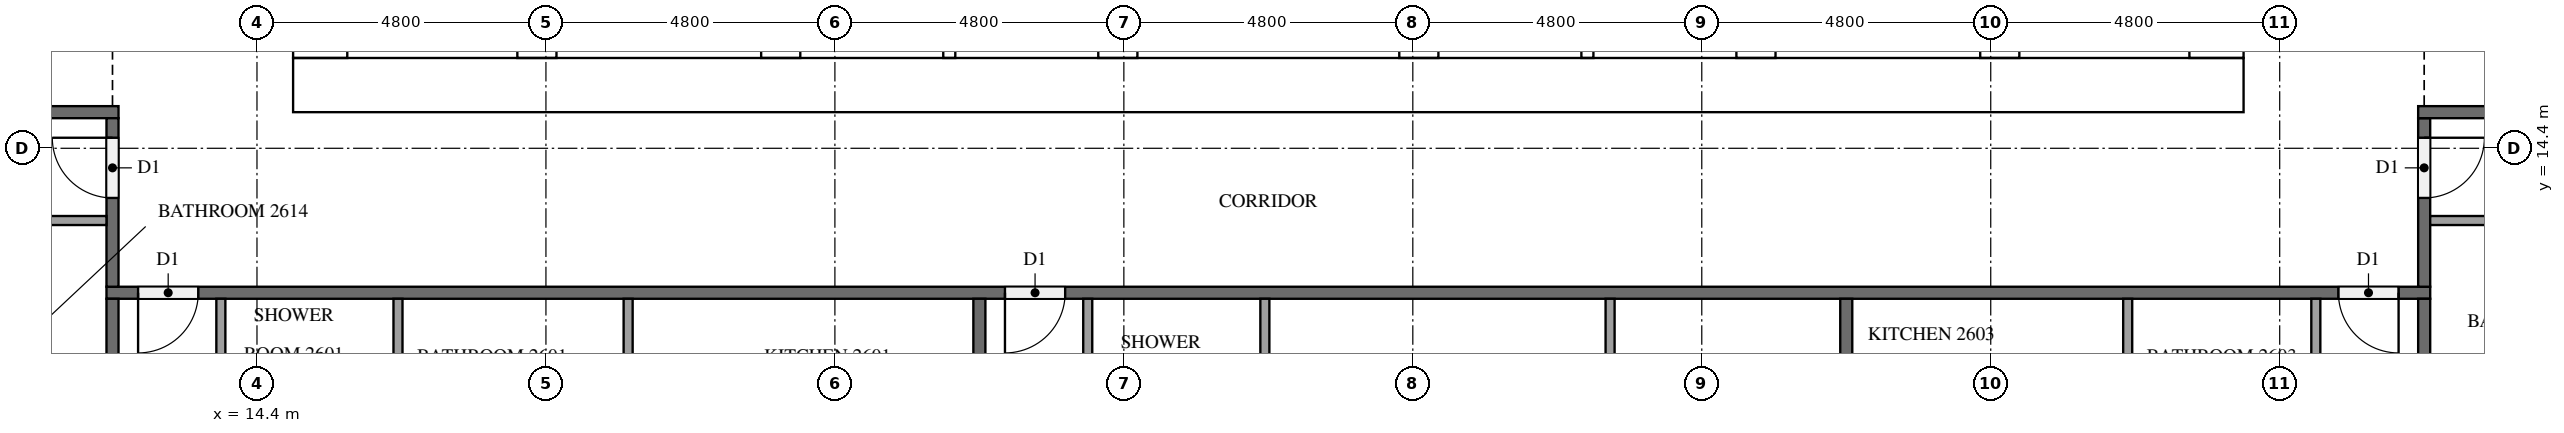
"""IFC4 building model, lengths in metres.
Left out: names, types, materials, properties, quantities, classifications, styles, units other than length and angle.
Written with IfcOpenShell. Run it as: python <this file> out.ifc"""

import sys

from ifc_helpers import new_model, si_unit, direction, frame, frame_2d, origin, place, context, subcontext, project, spatial, rectangle, extrude, element, fill, save


model = new_model("IFC4")
c1 = context("Model", 3, precision=1e-05, world=origin(), true_north=direction((0.0, 1.0)))
c2 = subcontext(c1, "Body", "Model", "MODEL_VIEW")
j1 = project(units=[si_unit("LENGTHUNIT", "METRE"), si_unit("PLANEANGLEUNIT", "RADIAN")], contexts=[c1])
p1 = place(None, origin())
s1 = spatial("IfcSite", under=j1, at=p1, CompositionType="ELEMENT")
p2 = place(p1, origin())
s2 = spatial("IfcBuilding", under=s1, at=p2, CompositionType="ELEMENT")
p3 = place(p2, frame((0.0, 0.0, 103.2)))
s3 = spatial("IfcBuildingStorey", under=s2, at=p3, CompositionType="ELEMENT", Elevation=103.2)
p4 = place(p3, frame((15.0, 15.45, 0.0), z_axis=(0.0, 0.0, 1.0), x_axis=(1.0, 0.0, 0.0)))
e1 = element("IfcWall", 1, at=p4, inside=s3, PredefinedType="SHEAR", context=c2, shape_type="SweptSolid", body=[
    extrude(rectangle(XDim=32.4, YDim=0.9, at=frame_2d((16.2, 0.0))), origin(), (0.0, 0.0, 1.0), 3.2),
])
p5 = place(p4, frame((15.3, 0.0, 0.0)))
e2 = element("IfcOpeningElement", 2, at=p5, cuts=e1, PredefinedType="OPENING", context=c2, shape_type="SweptSolid", body=[
    extrude(rectangle(XDim=1.8, YDim=2.1, at=frame_2d((0.9, 1.05))), frame((0.0, 0.46, 0.0), z_axis=(0.0, -1.0, 0.0), x_axis=(1.0, 0.0, 0.0)), (0.0, 0.0, 1.0), 0.92),
])
p6 = place(p3, frame((15.45, 15.9, 0.0), z_axis=(0.0, 0.0, 1.0), x_axis=(0.0, 1.0, 0.0)))
e3 = element("IfcWall", 3, at=p6, inside=s3, PredefinedType="SHEAR", context=c2, shape_type="SweptSolid", body=[
    extrude(rectangle(XDim=21.0, YDim=0.9, at=frame_2d((10.5, 0.0))), origin(), (0.0, 0.0, 1.0), 3.2),
])
p7 = place(p6, frame((4.86, 0.0, 0.0)))
e4 = element("IfcOpeningElement", 4, at=p7, cuts=e3, PredefinedType="OPENING", context=c2, shape_type="SweptSolid", body=[
    extrude(rectangle(XDim=1.2, YDim=2.1, at=frame_2d((0.6, 1.05))), frame((0.0, 0.46, 0.0), z_axis=(0.0, -1.0, 0.0), x_axis=(1.0, 0.0, 0.0)), (0.0, 0.0, 1.0), 0.92),
])
p8 = place(p3, frame((46.95, 15.9, 0.0), z_axis=(0.0, 0.0, 1.0), x_axis=(0.0, 1.0, 0.0)))
e5 = element("IfcWall", 5, at=p8, inside=s3, PredefinedType="SHEAR", context=c2, shape_type="SweptSolid", body=[
    extrude(rectangle(XDim=21.0, YDim=0.9, at=frame_2d((10.5, 0.0))), origin(), (0.0, 0.0, 1.0), 3.2),
])
p9 = place(p8, frame((10.2, 0.0, 0.0)))
e6 = element("IfcOpeningElement", 6, at=p9, cuts=e5, PredefinedType="OPENING", context=c2, shape_type="SweptSolid", body=[
    extrude(rectangle(XDim=1.2, YDim=2.1, at=frame_2d((0.6, 1.05))), frame((0.0, 0.46, 0.0), z_axis=(0.0, -1.0, 0.0), x_axis=(1.0, 0.0, 0.0)), (0.0, 0.0, 1.0), 0.92),
])
p10 = place(p3, frame((19.05, 15.9, 0.0), z_axis=(0.0, 0.0, 1.0), x_axis=(0.0, 1.0, 0.0)))
e7 = element("IfcWall", 7, at=p10, inside=s3, PredefinedType="SHEAR", context=c2, shape_type="SweptSolid", body=[
    extrude(rectangle(XDim=15.025, YDim=0.65, at=frame_2d((7.513, 0.0))), origin(), (0.0, 0.0, 1.0), 3.2),
])
p11 = place(p10, frame((9.55, 0.0, 0.0)))
e8 = element("IfcOpeningElement", 8, at=p11, cuts=e7, PredefinedType="OPENING", context=c2, shape_type="SweptSolid", body=[
    extrude(rectangle(XDim=1.1, YDim=2.1, at=frame_2d((0.55, 1.05))), frame((0.0, 0.335, 0.0), z_axis=(0.0, -1.0, 0.0), x_axis=(1.0, 0.0, 0.0)), (0.0, 0.0, 1.0), 0.67),
])
p12 = place(p10, frame((13.05, 0.0, 0.0)))
e9 = element("IfcOpeningElement", 9, at=p12, cuts=e7, PredefinedType="OPENING", context=c2, shape_type="SweptSolid", body=[
    extrude(rectangle(XDim=1.1, YDim=2.1, at=frame_2d((0.55, 1.05))), frame((0.0, 0.335, 0.0), z_axis=(0.0, -1.0, 0.0), x_axis=(1.0, 0.0, 0.0)), (0.0, 0.0, 1.0), 0.67),
])
p13 = place(p10, frame((0.3, 0.0, 0.0)))
e10 = element("IfcOpeningElement", 10, at=p13, cuts=e7, PredefinedType="OPENING", context=c2, shape_type="SweptSolid", body=[
    extrude(rectangle(XDim=1.2, YDim=2.1, at=frame_2d((0.6, 1.05))), frame((0.0, 0.335, 0.0), z_axis=(0.0, -1.0, 0.0), x_axis=(1.0, 0.0, 0.0)), (0.0, 0.0, 1.0), 0.67),
])
p14 = place(p3, frame((23.1, 15.9, 0.0), z_axis=(0.0, 0.0, 1.0), x_axis=(0.0, 1.0, 0.0)))
e11 = element("IfcWall", 11, at=p14, inside=s3, PredefinedType="SHEAR", context=c2, shape_type="SweptSolid", body=[
    extrude(rectangle(XDim=21.0, YDim=0.65, at=frame_2d((10.5, 0.0))), origin(), (0.0, 0.0, 1.0), 3.2),
])
p15 = place(p3, frame((39.3, 15.9, 0.0), z_axis=(0.0, 0.0, 1.0), x_axis=(0.0, 1.0, 0.0)))
e12 = element("IfcWall", 12, at=p15, inside=s3, PredefinedType="SHEAR", context=c2, shape_type="SweptSolid", body=[
    extrude(rectangle(XDim=8.35, YDim=0.65, at=frame_2d((4.175, 0.0))), origin(), (0.0, 0.0, 1.0), 3.2),
])
p16 = place(p3, frame((43.35, 15.9, 0.0), z_axis=(0.0, 0.0, 1.0), x_axis=(0.0, 1.0, 0.0)))
e13 = element("IfcWall", 13, at=p16, inside=s3, PredefinedType="SHEAR", context=c2, shape_type="SweptSolid", body=[
    extrude(rectangle(XDim=8.35, YDim=0.65, at=frame_2d((4.175, 0.0))), origin(), (0.0, 0.0, 1.0), 3.2),
])
p17 = place(p16, frame((0.3, 0.0, 0.0)))
e14 = element("IfcOpeningElement", 14, at=p17, cuts=e13, PredefinedType="OPENING", context=c2, shape_type="SweptSolid", body=[
    extrude(rectangle(XDim=1.2, YDim=2.1, at=frame_2d((0.6, 1.05))), frame((0.0, 0.335, 0.0), z_axis=(0.0, -1.0, 0.0), x_axis=(1.0, 0.0, 0.0)), (0.0, 0.0, 1.0), 0.67),
])
for number, where, z_axis, x_axis in (
    (15, (28.7, 15.9, 0.0), (0.0, 0.0, 1.0), (0.0, 1.0, 0.0)),
    (16, (33.7, 15.9, 0.0), (0.0, 0.0, 1.0), (0.0, 1.0, 0.0)),
):
    element("IfcWall", number, at=place(p3, frame(where, z_axis=z_axis, x_axis=x_axis)), inside=s3, PredefinedType="SHEAR", context=c2, shape_type="SweptSolid", body=[
        extrude(rectangle(XDim=2.525, YDim=0.65, at=frame_2d((1.263, 0.0))), origin(), (0.0, 0.0, 1.0), 3.2),
    ])
for number, where, z_axis, x_axis in (
    (17, (25.9, 15.9, 0.0), (0.0, 0.0, 1.0), (0.0, 1.0, 0.0)),
    (18, (36.5, 15.9, 0.0), (0.0, 0.0, 1.0), (0.0, 1.0, 0.0)),
):
    element("IfcWall", number, at=place(p3, frame(where, z_axis=z_axis, x_axis=x_axis)), inside=s3, PredefinedType="SOLIDWALL", context=c2, shape_type="SweptSolid", body=[
        extrude(rectangle(XDim=2.525, YDim=0.2, at=frame_2d((1.263, 0.0))), origin(), (0.0, 0.0, 1.0), 3.2),
    ])
p18 = place(p3, frame((50.5, 12.0, 0.0), z_axis=(0.0, 0.0, 1.0), x_axis=(-1.0, 0.0, 0.0)))
e19 = element("IfcWall", 19, at=p18, inside=s3, PredefinedType="PARTITIONING", context=c2, shape_type="SweptSolid", body=[
    extrude(rectangle(XDim=38.6, YDim=0.2, at=frame_2d((19.3, 0.0))), origin(), (0.0, 0.0, 1.0), 3.2),
])
p19 = place(p18, frame((37.075, 0.0, 0.0)))
e20 = element("IfcOpeningElement", 20, at=p19, cuts=e19, PredefinedType="OPENING", context=c2, shape_type="SweptSolid", body=[
    extrude(rectangle(XDim=1.0, YDim=2.1, at=frame_2d((0.5, 1.05))), frame((0.0, 0.11, 0.0), z_axis=(0.0, -1.0, 0.0), x_axis=(1.0, 0.0, 0.0)), (0.0, 0.0, 1.0), 0.22),
])
p20 = place(p18, frame((22.675, 0.0, 0.0)))
e21 = element("IfcOpeningElement", 21, at=p20, cuts=e19, PredefinedType="OPENING", context=c2, shape_type="SweptSolid", body=[
    extrude(rectangle(XDim=1.0, YDim=2.1, at=frame_2d((0.5, 1.05))), frame((0.0, 0.11, 0.0), z_axis=(0.0, -1.0, 0.0), x_axis=(1.0, 0.0, 0.0)), (0.0, 0.0, 1.0), 0.22),
])
p21 = place(p18, frame((0.525, 0.0, 0.0)))
e22 = element("IfcOpeningElement", 22, at=p21, cuts=e19, PredefinedType="OPENING", context=c2, shape_type="SweptSolid", body=[
    extrude(rectangle(XDim=1.0, YDim=2.1, at=frame_2d((0.5, 1.05))), frame((0.0, 0.11, 0.0), z_axis=(0.0, -1.0, 0.0), x_axis=(1.0, 0.0, 0.0)), (0.0, 0.0, 1.0), 0.22),
])
p22 = place(p3, frame((50.4, 14.9, 0.0), z_axis=(0.0, 0.0, 1.0), x_axis=(0.0, -1.0, 0.0)))
e23 = element("IfcWall", 23, at=p22, inside=s3, PredefinedType="PARTITIONING", context=c2, shape_type="SweptSolid", body=[
    extrude(rectangle(XDim=2.8, YDim=0.2, at=frame_2d((1.4, 0.0))), origin(), (0.0, 0.0, 1.0), 3.2),
])
p23 = place(p22, frame((0.325, 0.0, 0.0)))
e24 = element("IfcOpeningElement", 24, at=p23, cuts=e23, PredefinedType="OPENING", context=c2, shape_type="SweptSolid", body=[
    extrude(rectangle(XDim=1.0, YDim=2.1, at=frame_2d((0.5, 1.05))), frame((0.0, 0.11, 0.0), z_axis=(0.0, -1.0, 0.0), x_axis=(1.0, 0.0, 0.0)), (0.0, 0.0, 1.0), 0.22),
])
p24 = place(p3, frame((50.3, 15.0, 0.0), z_axis=(0.0, 0.0, 1.0), x_axis=(1.0, 0.0, 0.0)))
e25 = element("IfcWall", 25, at=p24, inside=s3, PredefinedType="PARTITIONING", context=c2, shape_type="SweptSolid", body=[
    extrude(rectangle(XDim=2.2, YDim=0.2, at=frame_2d((1.1, 0.0))), origin(), (0.0, 0.0, 1.0), 3.2),
])
p25 = place(p3, frame((9.9, 15.0, 0.0), z_axis=(0.0, 0.0, 1.0), x_axis=(1.0, 0.0, 0.0)))
e26 = element("IfcWall", 26, at=p25, inside=s3, PredefinedType="PARTITIONING", context=c2, shape_type="SweptSolid", body=[
    extrude(rectangle(XDim=2.2, YDim=0.2, at=frame_2d((1.1, 0.0))), origin(), (0.0, 0.0, 1.0), 3.2),
])
p26 = place(p3, frame((12.0, 12.1, 0.0), z_axis=(0.0, 0.0, 1.0), x_axis=(0.0, 1.0, 0.0)))
e27 = element("IfcWall", 27, at=p26, inside=s3, PredefinedType="PARTITIONING", context=c2, shape_type="SweptSolid", body=[
    extrude(rectangle(XDim=2.8, YDim=0.2, at=frame_2d((1.4, 0.0))), origin(), (0.0, 0.0, 1.0), 3.2),
])
p27 = place(p26, frame((1.475, 0.0, 0.0)))
e28 = element("IfcOpeningElement", 28, at=p27, cuts=e27, PredefinedType="OPENING", context=c2, shape_type="SweptSolid", body=[
    extrude(rectangle(XDim=1.0, YDim=2.1, at=frame_2d((0.5, 1.05))), frame((0.0, 0.11, 0.0), z_axis=(0.0, -1.0, 0.0), x_axis=(1.0, 0.0, 0.0)), (0.0, 0.0, 1.0), 0.22),
])
for number, where, z_axis, x_axis in (
    (29, (26.4, 11.9, 0.0), (0.0, 0.0, 1.0), (0.0, -1.0, 0.0)),
    (30, (12.0, 4.9, 0.0), (0.0, 0.0, 1.0), (0.0, 1.0, 0.0)),
    (31, (40.8, 11.9, 0.0), (0.0, 0.0, 1.0), (0.0, -1.0, 0.0)),
    (32, (50.4, 11.9, 0.0), (0.0, 0.0, 1.0), (0.0, -1.0, 0.0)),
):
    element("IfcWall", number, at=place(p3, frame(where, z_axis=z_axis, x_axis=x_axis)), inside=s3, PredefinedType="PARTITIONING", context=c2, shape_type="SweptSolid", body=[
        extrude(rectangle(XDim=7.0, YDim=0.2, at=frame_2d((3.5, 0.0))), origin(), (0.0, 0.0, 1.0), 3.2),
    ])
for number, where, z_axis, x_axis in (
    (33, (16.742, 11.9, 0.0), (0.0, 0.0, 1.0), (0.0, -1.0, 0.0)),
    (34, (20.565, 11.9, 0.0), (0.0, 0.0, 1.0), (0.0, -1.0, 0.0)),
):
    element("IfcWall", number, at=place(p3, frame(where, z_axis=z_axis, x_axis=x_axis)), inside=s3, PredefinedType="PARTITIONING", context=c2, shape_type="SweptSolid", body=[
        extrude(rectangle(XDim=1.925, YDim=0.15, at=frame_2d((0.962, 0.0))), origin(), (0.0, 0.0, 1.0), 3.2),
    ])
p28 = place(p3, frame((13.8, 11.9, 0.0), z_axis=(0.0, 0.0, 1.0), x_axis=(0.0, -1.0, 0.0)))
e35 = element("IfcWall", 35, at=p28, inside=s3, PredefinedType="PARTITIONING", context=c2, shape_type="SweptSolid", body=[
    extrude(rectangle(XDim=2.075, YDim=0.15, at=frame_2d((1.038, 0.0))), origin(), (0.0, 0.0, 1.0), 3.2),
])
for number, where, z_axis, x_axis in (
    (36, (31.142, 11.9, 0.0), (0.0, 0.0, 1.0), (0.0, -1.0, 0.0)),
    (37, (36.877, 11.9, 0.0), (0.0, 0.0, 1.0), (0.0, -1.0, 0.0)),
):
    element("IfcWall", number, at=place(p3, frame(where, z_axis=z_axis, x_axis=x_axis)), inside=s3, PredefinedType="PARTITIONING", context=c2, shape_type="SweptSolid", body=[
        extrude(rectangle(XDim=2.375, YDim=0.15, at=frame_2d((1.188, 0.0))), origin(), (0.0, 0.0, 1.0), 3.2),
    ])
p29 = place(p3, frame((28.2, 11.9, 0.0), z_axis=(0.0, 0.0, 1.0), x_axis=(0.0, -1.0, 0.0)))
e38 = element("IfcWall", 38, at=p29, inside=s3, PredefinedType="PARTITIONING", context=c2, shape_type="SweptSolid", body=[
    extrude(rectangle(XDim=2.525, YDim=0.15, at=frame_2d((1.262, 0.0))), origin(), (0.0, 0.0, 1.0), 3.2),
])
p30 = place(p3, frame((45.475, 11.9, 0.0), z_axis=(0.0, 0.0, 1.0), x_axis=(0.0, -1.0, 0.0)))
e39 = element("IfcWall", 39, at=p30, inside=s3, PredefinedType="PARTITIONING", context=c2, shape_type="SweptSolid", body=[
    extrude(rectangle(XDim=1.925, YDim=0.15, at=frame_2d((0.962, 0.0))), origin(), (0.0, 0.0, 1.0), 3.2),
])
p31 = place(p3, frame((48.6, 11.9, 0.0), z_axis=(0.0, 0.0, 1.0), x_axis=(0.0, -1.0, 0.0)))
e40 = element("IfcWall", 40, at=p31, inside=s3, PredefinedType="PARTITIONING", context=c2, shape_type="SweptSolid", body=[
    extrude(rectangle(XDim=2.075, YDim=0.15, at=frame_2d((1.038, 0.0))), origin(), (0.0, 0.0, 1.0), 3.2),
])
p32 = place(p3, frame((50.5, 13.2, 0.0), z_axis=(0.0, 0.0, 1.0), x_axis=(1.0, 0.0, 0.0)))
e41 = element("IfcWall", 41, at=p32, inside=s3, PredefinedType="PARTITIONING", context=c2, shape_type="SweptSolid", body=[
    extrude(rectangle(XDim=3.875, YDim=0.15, at=frame_2d((1.938, 0.0))), origin(), (0.0, 0.0, 1.0), 3.2),
])
p33 = place(p3, frame((11.9, 13.2, 0.0), z_axis=(0.0, 0.0, 1.0), x_axis=(-1.0, 0.0, 0.0)))
e42 = element("IfcWall", 42, at=p33, inside=s3, PredefinedType="PARTITIONING", context=c2, shape_type="SweptSolid", body=[
    extrude(rectangle(XDim=2.225, YDim=0.15, at=frame_2d((1.112, 0.0))), origin(), (0.0, 0.0, 1.0), 3.2),
])
p34 = place(p5, frame((1.8, 0.0, 0.0), z_axis=(0.0, 0.0, 1.0), x_axis=(-1.0, 0.0, 0.0)))
e43 = element("IfcDoor", 43, at=p34, inside=s3, OperationType="DOUBLE_DOOR_SINGLE_SWING", PredefinedType="DOOR", context=c2, shape_type="SweptSolid", body=[
    extrude(rectangle(XDim=1.8, YDim=2.1, at=frame_2d((0.9, 1.05))), frame((0.0, 0.025, 0.0), z_axis=(0.0, -1.0, 0.0), x_axis=(1.0, 0.0, 0.0)), (0.0, 0.0, 1.0), 0.05),
])
fill(e2, e43)
p35 = place(p19, origin())
e44 = element("IfcDoor", 44, at=p35, inside=s3, OperationType="SINGLE_SWING_RIGHT", PredefinedType="DOOR", context=c2, shape_type="SweptSolid", body=[
    extrude(rectangle(XDim=1.0, YDim=2.1, at=frame_2d((0.5, 1.05))), frame((0.0, 0.025, 0.0), z_axis=(0.0, -1.0, 0.0), x_axis=(1.0, 0.0, 0.0)), (0.0, 0.0, 1.0), 0.05),
])
fill(e20, e44)
p36 = place(p20, origin())
e45 = element("IfcDoor", 45, at=p36, inside=s3, OperationType="SINGLE_SWING_RIGHT", PredefinedType="DOOR", context=c2, shape_type="SweptSolid", body=[
    extrude(rectangle(XDim=1.0, YDim=2.1, at=frame_2d((0.5, 1.05))), frame((0.0, 0.025, 0.0), z_axis=(0.0, -1.0, 0.0), x_axis=(1.0, 0.0, 0.0)), (0.0, 0.0, 1.0), 0.05),
])
fill(e21, e45)
p37 = place(p21, origin())
e46 = element("IfcDoor", 46, at=p37, inside=s3, OperationType="SINGLE_SWING_LEFT", PredefinedType="DOOR", context=c2, shape_type="SweptSolid", body=[
    extrude(rectangle(XDim=1.0, YDim=2.1, at=frame_2d((0.5, 1.05))), frame((0.0, 0.025, 0.0), z_axis=(0.0, -1.0, 0.0), x_axis=(1.0, 0.0, 0.0)), (0.0, 0.0, 1.0), 0.05),
])
fill(e22, e46)
p38 = place(p23, origin())
e47 = element("IfcDoor", 47, at=p38, inside=s3, OperationType="SINGLE_SWING_LEFT", PredefinedType="DOOR", context=c2, shape_type="SweptSolid", body=[
    extrude(rectangle(XDim=1.0, YDim=2.1, at=frame_2d((0.5, 1.05))), frame((0.0, 0.025, 0.0), z_axis=(0.0, -1.0, 0.0), x_axis=(1.0, 0.0, 0.0)), (0.0, 0.0, 1.0), 0.05),
])
fill(e24, e47)
p39 = place(p27, origin())
e48 = element("IfcDoor", 48, at=p39, inside=s3, OperationType="SINGLE_SWING_RIGHT", PredefinedType="DOOR", context=c2, shape_type="SweptSolid", body=[
    extrude(rectangle(XDim=1.0, YDim=2.1, at=frame_2d((0.5, 1.05))), frame((0.0, 0.025, 0.0), z_axis=(0.0, -1.0, 0.0), x_axis=(1.0, 0.0, 0.0)), (0.0, 0.0, 1.0), 0.05),
])
fill(e28, e48)
save(model, sys.argv[1])
